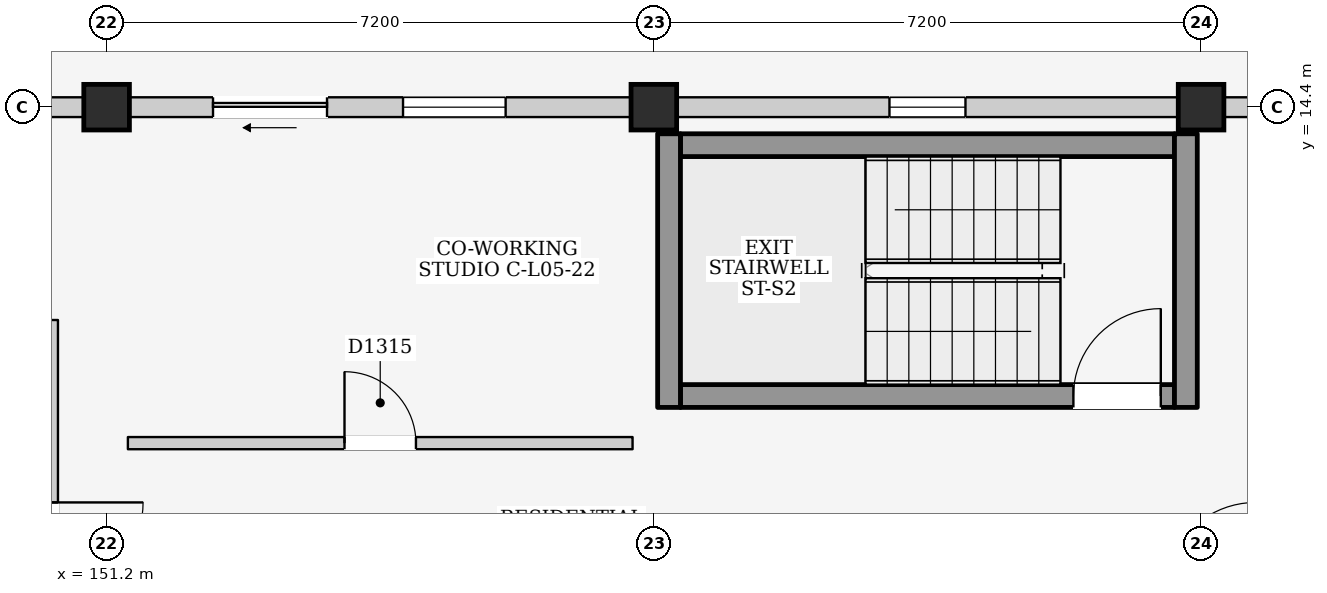
"""IFC4 building model, lengths in metres.
Left out: names, types, materials, properties, quantities, classifications, styles, units other than length and angle.
Written with IfcOpenShell. Run it as: python <this file> out.ifc"""

import sys

from ifc_helpers import new_model, si_unit, direction, frame, frame_2d, origin, origin_2d, place, context, subcontext, project, spatial, rectangle, extrude, element, fill, save


model = new_model("IFC4")
c1 = context("Model", 3, precision=1e-05, world=origin(), true_north=direction((0.0, 1.0)))
c2 = subcontext(c1, "Body", "Model", "MODEL_VIEW")
j1 = project(units=[si_unit("LENGTHUNIT", "METRE"), si_unit("PLANEANGLEUNIT", "RADIAN")], contexts=[c1])
p1 = place(None, origin())
s1 = spatial("IfcSite", under=j1, at=p1, CompositionType="ELEMENT")
p2 = place(p1, origin())
s2 = spatial("IfcBuilding", under=s1, at=p2, CompositionType="ELEMENT")
p3 = place(p2, frame((0.0, 0.0, 18.6)))
s3 = spatial("IfcBuildingStorey", under=s2, at=p3, CompositionType="ELEMENT", Elevation=18.6)
for number, where, z_axis, x_axis in (
    (1, (151.2, 14.4, 0.0), (0.0, 0.0, 1.0), (1.0, 0.0, 0.0)),
    (2, (158.4, 14.4, 0.0), (0.0, 0.0, 1.0), (1.0, 0.0, 0.0)),
    (3, (165.6, 14.4, 0.0), (0.0, 0.0, 1.0), (1.0, 0.0, 0.0)),
):
    element("IfcColumn", number, at=place(p3, frame(where, z_axis=z_axis, x_axis=x_axis)), inside=s3, PredefinedType="COLUMN", context=c2, shape_type="SweptSolid", body=[
        extrude(rectangle(XDim=0.6, YDim=0.6, at=origin_2d()), origin(), (0.0, 0.0, 1.0), 3.3),
    ])
p4 = place(p3, frame((144.3, 14.4, 0.0), z_axis=(0.0, 0.0, 1.0), x_axis=(1.0, 0.0, 0.0)))
e4 = element("IfcWall", 4, at=p4, inside=s3, PredefinedType="ELEMENTEDWALL", context=c2, shape_type="SweptSolid", body=[
    extrude(rectangle(XDim=6.6, YDim=0.26, at=frame_2d((3.3, 0.0))), origin(), (0.0, 0.0, 1.0), 2.445),
])
p5 = place(p4, frame((2.8, 0.0, 1.2)))
e5 = element("IfcOpeningElement", 5, at=p5, cuts=e4, PredefinedType="OPENING", context=c2, shape_type="SweptSolid", body=[
    extrude(rectangle(XDim=1.0, YDim=0.9, at=frame_2d((0.5, 0.45))), frame((0.0, 0.145, 0.0), z_axis=(0.0, -1.0, 0.0), x_axis=(1.0, 0.0, 0.0)), (0.0, 0.0, 1.0), 0.29),
])
p6 = place(p3, frame((151.5, 14.4, 0.0), z_axis=(0.0, 0.0, 1.0), x_axis=(1.0, 0.0, 0.0)))
e6 = element("IfcWall", 6, at=p6, inside=s3, PredefinedType="ELEMENTEDWALL", context=c2, shape_type="SweptSolid", body=[
    extrude(rectangle(XDim=6.6, YDim=0.26, at=frame_2d((3.3, 0.0))), origin(), (0.0, 0.0, 1.0), 2.445),
])
p7 = place(p6, frame((1.1, 0.0, 0.0)))
e7 = element("IfcOpeningElement", 7, at=p7, cuts=e6, PredefinedType="OPENING", context=c2, shape_type="SweptSolid", body=[
    extrude(rectangle(XDim=1.5, YDim=2.12, at=frame_2d((0.75, 1.06))), frame((0.0, 0.145, 0.0), z_axis=(0.0, -1.0, 0.0), x_axis=(1.0, 0.0, 0.0)), (0.0, 0.0, 1.0), 0.29),
])
p8 = place(p6, frame((3.6, 0.0, 0.835)))
e8 = element("IfcOpeningElement", 8, at=p8, cuts=e6, PredefinedType="OPENING", context=c2, shape_type="SweptSolid", body=[
    extrude(rectangle(XDim=1.35, YDim=1.5, at=frame_2d((0.675, 0.75))), frame((0.0, 0.145, 0.0), z_axis=(0.0, -1.0, 0.0), x_axis=(1.0, 0.0, 0.0)), (0.0, 0.0, 1.0), 0.29),
])
p9 = place(p3, frame((158.7, 14.4, 0.0), z_axis=(0.0, 0.0, 1.0), x_axis=(1.0, 0.0, 0.0)))
e9 = element("IfcWall", 9, at=p9, inside=s3, PredefinedType="ELEMENTEDWALL", context=c2, shape_type="SweptSolid", body=[
    extrude(rectangle(XDim=6.6, YDim=0.26, at=frame_2d((3.3, 0.0))), origin(), (0.0, 0.0, 1.0), 2.445),
])
p10 = place(p9, frame((2.8, 0.0, 1.2)))
e10 = element("IfcOpeningElement", 10, at=p10, cuts=e9, PredefinedType="OPENING", context=c2, shape_type="SweptSolid", body=[
    extrude(rectangle(XDim=1.0, YDim=0.9, at=frame_2d((0.5, 0.45))), frame((0.0, 0.145, 0.0), z_axis=(0.0, -1.0, 0.0), x_axis=(1.0, 0.0, 0.0)), (0.0, 0.0, 1.0), 0.29),
])
p11 = place(p3, frame((165.9, 14.4, 0.0), z_axis=(0.0, 0.0, 1.0), x_axis=(1.0, 0.0, 0.0)))
e11 = element("IfcWall", 11, at=p11, inside=s3, PredefinedType="ELEMENTEDWALL", context=c2, shape_type="SweptSolid", body=[
    extrude(rectangle(XDim=6.6, YDim=0.26, at=frame_2d((3.3, 0.0))), origin(), (0.0, 0.0, 1.0), 2.445),
])
p12 = place(p11, frame((2.8, 0.0, 1.2)))
e12 = element("IfcOpeningElement", 12, at=p12, cuts=e11, PredefinedType="OPENING", context=c2, shape_type="SweptSolid", body=[
    extrude(rectangle(XDim=1.0, YDim=0.9, at=frame_2d((0.5, 0.45))), frame((0.0, 0.145, 0.0), z_axis=(0.0, -1.0, 0.0), x_axis=(1.0, 0.0, 0.0)), (0.0, 0.0, 1.0), 0.29),
])
p13 = place(p3, frame((150.48, 7.28, 0.0), z_axis=(0.0, 0.0, 1.0), x_axis=(0.0, 1.0, 0.0)))
e13 = element("IfcWall", 13, at=p13, inside=s3, PredefinedType="PARTITIONING", context=c2, shape_type="SweptSolid", body=[
    extrude(rectangle(XDim=4.32, YDim=0.16, at=frame_2d((2.16, 0.0))), origin(), (0.0, 0.0, 1.0), 3.06),
])
p14 = place(p13, frame((0.72, 0.0, 0.0)))
e14 = element("IfcOpeningElement", 14, at=p14, cuts=e13, PredefinedType="OPENING", context=c2, shape_type="SweptSolid", body=[
    extrude(rectangle(XDim=1.2, YDim=2.2, at=frame_2d((0.6, 1.1))), frame((0.0, 0.095, 0.0), z_axis=(0.0, -1.0, 0.0), x_axis=(1.0, 0.0, 0.0)), (0.0, 0.0, 1.0), 0.19),
])
p15 = place(p3, frame((158.75, 10.6, 0.0), z_axis=(0.0, 0.0, 1.0), x_axis=(1.0, 0.0, 0.0)))
e15 = element("IfcWall", 15, at=p15, inside=s3, PredefinedType="SHEAR", context=c2, shape_type="SweptSolid", body=[
    extrude(rectangle(XDim=6.5, YDim=0.3, at=frame_2d((3.25, 0.0))), origin(), (0.0, 0.0, 1.0), 3.06),
])
p16 = place(p15, frame((5.17, 0.0, 0.0)))
e16 = element("IfcOpeningElement", 16, at=p16, cuts=e15, PredefinedType="OPENING", context=c2, shape_type="SweptSolid", body=[
    extrude(rectangle(XDim=1.15, YDim=2.2, at=frame_2d((0.575, 1.1))), frame((0.0, 0.165, 0.0), z_axis=(0.0, -1.0, 0.0), x_axis=(1.0, 0.0, 0.0)), (0.0, 0.0, 1.0), 0.33),
])
p17 = place(p3, frame((158.75, 13.9, 0.0), z_axis=(0.0, 0.0, 1.0), x_axis=(1.0, 0.0, 0.0)))
e17 = element("IfcWall", 17, at=p17, inside=s3, PredefinedType="SHEAR", context=c2, shape_type="SweptSolid", body=[
    extrude(rectangle(XDim=6.5, YDim=0.3, at=frame_2d((3.25, 0.0))), origin(), (0.0, 0.0, 1.0), 3.06),
])
for number, where, z_axis, x_axis in (
    (18, (158.6, 10.45, 0.0), (0.0, 0.0, 1.0), (0.0, 1.0, 0.0)),
    (19, (165.4, 10.45, 0.0), (0.0, 0.0, 1.0), (0.0, 1.0, 0.0)),
):
    element("IfcWall", number, at=place(p3, frame(where, z_axis=z_axis, x_axis=x_axis)), inside=s3, PredefinedType="SHEAR", context=c2, shape_type="SweptSolid", body=[
        extrude(rectangle(XDim=3.6, YDim=0.3, at=frame_2d((1.8, 0.0))), origin(), (0.0, 0.0, 1.0), 3.06),
    ])
p18 = place(p3, frame((151.48, 9.98, 0.0), z_axis=(0.0, 0.0, 1.0), x_axis=(1.0, 0.0, 0.0)))
e20 = element("IfcWall", 20, at=p18, inside=s3, PredefinedType="PARTITIONING", context=c2, shape_type="SweptSolid", body=[
    extrude(rectangle(XDim=6.64, YDim=0.16, at=frame_2d((3.32, 0.0))), origin(), (0.0, 0.0, 1.0), 3.06),
])
p19 = place(p18, frame((2.85, 0.0, 0.0)))
e21 = element("IfcOpeningElement", 21, at=p19, cuts=e20, PredefinedType="OPENING", context=c2, shape_type="SweptSolid", body=[
    extrude(rectangle(XDim=0.94, YDim=2.12, at=frame_2d((0.47, 1.06))), frame((0.0, 0.095, 0.0), z_axis=(0.0, -1.0, 0.0), x_axis=(1.0, 0.0, 0.0)), (0.0, 0.0, 1.0), 0.19),
])
p20 = place(p7, frame((1.5, 0.0, 0.0), z_axis=(0.0, 0.0, 1.0), x_axis=(-1.0, 0.0, 0.0)))
e22 = element("IfcDoor", 22, at=p20, inside=s3, OperationType="SLIDING_TO_LEFT", PredefinedType="DOOR", context=c2, shape_type="SweptSolid", body=[
    extrude(rectangle(XDim=1.5, YDim=2.12, at=frame_2d((0.75, 1.06))), frame((0.0, 0.025, 0.0), z_axis=(0.0, -1.0, 0.0), x_axis=(1.0, 0.0, 0.0)), (0.0, 0.0, 1.0), 0.05),
])
fill(e7, e22)
p21 = place(p8, origin())
e23 = element("IfcWindow", 23, at=p21, inside=s3, PartitioningType="SINGLE_PANEL", PredefinedType="WINDOW", context=c2, shape_type="SweptSolid", body=[
    extrude(rectangle(XDim=1.35, YDim=1.5, at=frame_2d((0.675, 0.75))), frame((0.0, 0.03, 0.0), z_axis=(0.0, -1.0, 0.0), x_axis=(1.0, 0.0, 0.0)), (0.0, 0.0, 1.0), 0.06),
])
fill(e8, e23)
p22 = place(p10, origin())
e24 = element("IfcWindow", 24, at=p22, inside=s3, PartitioningType="SINGLE_PANEL", PredefinedType="WINDOW", context=c2, shape_type="SweptSolid", body=[
    extrude(rectangle(XDim=1.0, YDim=0.9, at=frame_2d((0.5, 0.45))), frame((0.0, 0.03, 0.0), z_axis=(0.0, -1.0, 0.0), x_axis=(1.0, 0.0, 0.0)), (0.0, 0.0, 1.0), 0.06),
])
fill(e10, e24)
p23 = place(p14, frame((1.2, 0.0, 0.0), z_axis=(0.0, 0.0, 1.0), x_axis=(-1.0, 0.0, 0.0)))
e25 = element("IfcDoor", 25, at=p23, inside=s3, OperationType="SINGLE_SWING_LEFT", PredefinedType="DOOR", context=c2, shape_type="SweptSolid", body=[
    extrude(rectangle(XDim=1.2, YDim=2.2, at=frame_2d((0.6, 1.1))), frame((0.0, 0.025, 0.0), z_axis=(0.0, -1.0, 0.0), x_axis=(1.0, 0.0, 0.0)), (0.0, 0.0, 1.0), 0.05),
])
fill(e14, e25)
p24 = place(p16, origin())
e26 = element("IfcDoor", 26, at=p24, inside=s3, OperationType="SINGLE_SWING_RIGHT", PredefinedType="DOOR", context=c2, shape_type="SweptSolid", body=[
    extrude(rectangle(XDim=1.15, YDim=2.2, at=frame_2d((0.575, 1.1))), frame((0.0, 0.025, 0.0), z_axis=(0.0, -1.0, 0.0), x_axis=(1.0, 0.0, 0.0)), (0.0, 0.0, 1.0), 0.05),
])
fill(e16, e26)
p25 = place(p19, origin())
e27 = element("IfcDoor", 27, at=p25, inside=s3, OperationType="SINGLE_SWING_LEFT", PredefinedType="DOOR", context=c2, shape_type="SweptSolid", body=[
    extrude(rectangle(XDim=0.94, YDim=2.12, at=frame_2d((0.47, 1.06))), frame((0.0, 0.025, 0.0), z_axis=(0.0, -1.0, 0.0), x_axis=(1.0, 0.0, 0.0)), (0.0, 0.0, 1.0), 0.05),
])
fill(e21, e27)
save(model, sys.argv[1])
